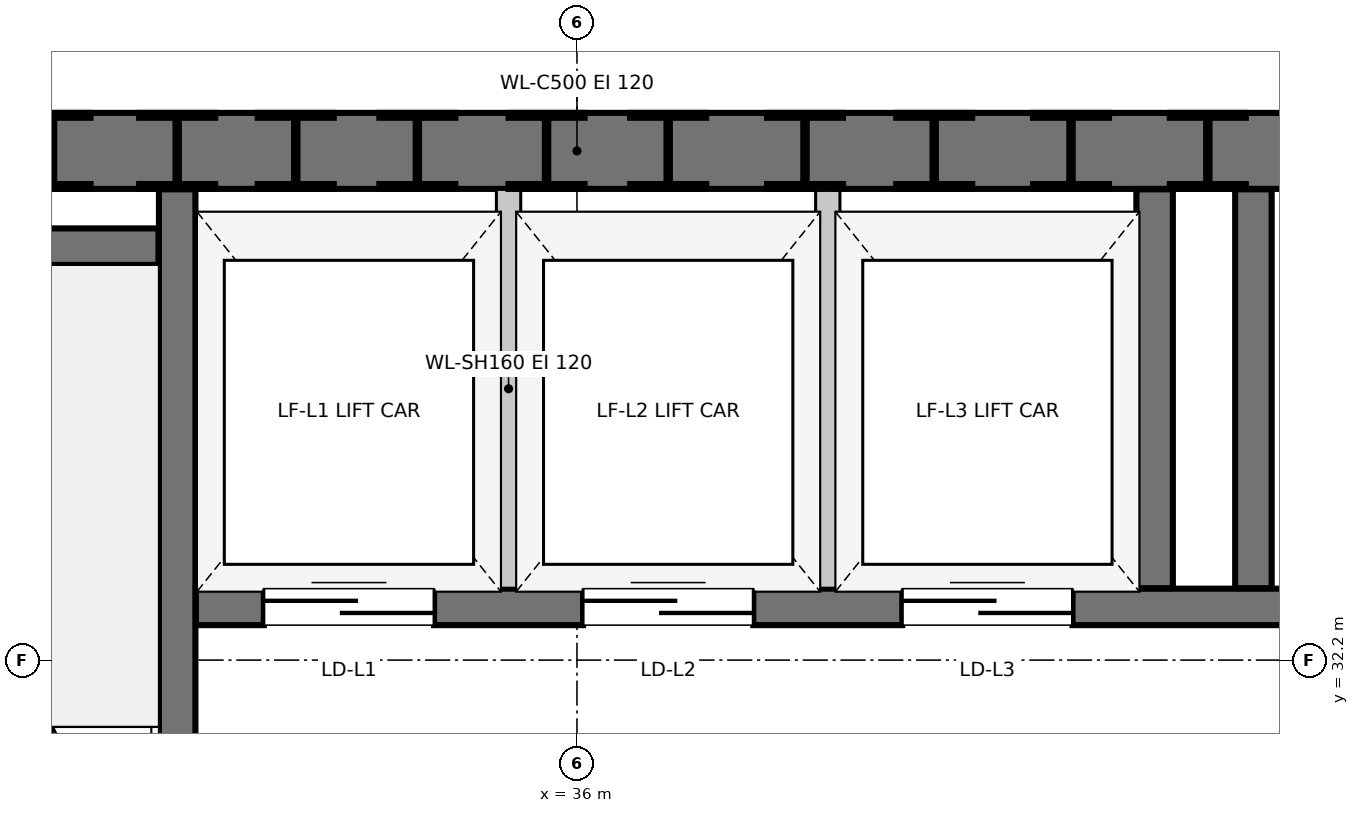
"""IFC4 building model, lengths in metres.
Left out: names, types, materials, properties, quantities, classifications, styles, units other than length and angle.
Written with IfcOpenShell. Run it as: python <this file> out.ifc"""

import sys

from ifc_helpers import new_model, si_unit, direction, frame, frame_2d, origin, origin_2d, place, context, subcontext, project, spatial, rectangle, i_section, extrude, element, fill, save


model = new_model("IFC4")
c1 = context("Model", 3, precision=1e-05, world=origin(), true_north=direction((0.0, 1.0)))
c2 = subcontext(c1, "Body", "Model", "MODEL_VIEW")
j1 = project(units=[si_unit("LENGTHUNIT", "METRE"), si_unit("PLANEANGLEUNIT", "RADIAN")], contexts=[c1])
p1 = place(None, origin())
s1 = spatial("IfcSite", under=j1, at=p1, CompositionType="ELEMENT")
p2 = place(p1, origin())
s2 = spatial("IfcBuilding", under=s1, at=p2, CompositionType="ELEMENT")
p3 = place(p2, frame((0.0, 0.0, 72.3)))
s3 = spatial("IfcBuildingStorey", under=s2, at=p3, CompositionType="ELEMENT", Elevation=72.3)
for number, where, z_axis, x_axis in (
    (1, (33.37, 35.55, 0.0), (0.0, 0.0, 1.0), (1.0, 0.0, 0.0)),
    (2, (34.95, 35.55, 0.0), (0.0, 0.0, 1.0), (1.0, 0.0, 0.0)),
    (3, (36.6, 35.55, 0.0), (0.0, 0.0, 1.0), (1.0, 0.0, 0.0)),
    (4, (38.35, 35.55, 0.0), (0.0, 0.0, 1.0), (1.0, 0.0, 0.0)),
    (5, (40.15, 35.55, 0.0), (0.0, 0.0, 1.0), (1.0, 0.0, 0.0)),
    (6, (32.55, 35.55, 0.0), (0.0, 0.0, 1.0), (1.0, 0.0, 0.0)),
    (7, (37.5, 35.55, 0.0), (0.0, 0.0, 1.0), (1.0, 0.0, 0.0)),
    (8, (34.15, 35.55, 0.0), (0.0, 0.0, 1.0), (1.0, 0.0, 0.0)),
    (9, (35.8, 35.55, 0.0), (0.0, 0.0, 1.0), (1.0, 0.0, 0.0)),
    (10, (39.25, 35.55, 0.0), (0.0, 0.0, 1.0), (1.0, 0.0, 0.0)),
):
    element("IfcColumn", number, at=place(p3, frame(where, z_axis=z_axis, x_axis=x_axis)), inside=s3, PredefinedType="COLUMN", context=c2, shape_type="SweptSolid", body=[
        extrude(i_section(OverallWidth=0.5, OverallDepth=0.5, WebThickness=0.022, FlangeThickness=0.032, at=origin_2d()), origin(), (0.0, 0.0, 1.0), 4.5),
    ])
p4 = place(p3, frame((50.35, 35.55, 0.0), z_axis=(0.0, 0.0, 1.0), x_axis=(-1.0, 0.0, 0.0)))
e11 = element("IfcWall", 11, at=p4, inside=s3, PredefinedType="SHEAR", context=c2, shape_type="SweptSolid", body=[
    extrude(rectangle(XDim=28.7, YDim=0.5, at=frame_2d((14.35, 0.0))), origin(), (0.0, 0.0, 1.0), 4.5),
])
p5 = place(p3, frame((33.37, 27.003, 0.0), z_axis=(0.0, 0.0, 1.0), x_axis=(0.0, 1.0, 0.0)))
e12 = element("IfcWall", 12, at=p5, inside=s3, PredefinedType="SHEAR", context=c2, shape_type="SweptSolid", body=[
    extrude(rectangle(XDim=8.294, YDim=0.24, at=frame_2d((4.147, 0.0))), origin(), (0.0, 0.0, 1.0), 4.5),
])
p6 = place(p3, frame((30.253, 34.92, 0.0), z_axis=(0.0, 0.0, 1.0), x_axis=(1.0, 0.0, 0.0)))
e13 = element("IfcWall", 13, at=p6, inside=s3, PredefinedType="SHEAR", context=c2, shape_type="SweptSolid", body=[
    extrude(rectangle(XDim=2.994, YDim=0.24, at=frame_2d((1.497, 0.0))), origin(), (0.0, 0.0, 1.0), 4.5),
])
p7 = place(p3, frame((33.493, 32.55, 0.0), z_axis=(0.0, 0.0, 1.0), x_axis=(1.0, 0.0, 0.0)))
e14 = element("IfcWall", 14, at=p7, inside=s3, PredefinedType="SHEAR", context=c2, shape_type="SweptSolid", body=[
    extrude(rectangle(XDim=13.214, YDim=0.24, at=frame_2d((6.607, 0.0))), origin(), (0.0, 0.0, 1.0), 4.5),
])
p8 = place(p7, frame((0.447, 0.0, 0.0)))
e15 = element("IfcOpeningElement", 15, at=p8, cuts=e14, PredefinedType="OPENING", context=c2, shape_type="SweptSolid", body=[
    extrude(rectangle(XDim=1.12, YDim=2.0, at=frame_2d((0.56, 1.0))), frame((0.0, 0.13, 0.0), z_axis=(0.0, -1.0, 0.0), x_axis=(1.0, 0.0, 0.0)), (0.0, 0.0, 1.0), 0.26),
])
p9 = place(p7, frame((2.547, 0.0, 0.0)))
e16 = element("IfcOpeningElement", 16, at=p9, cuts=e14, PredefinedType="OPENING", context=c2, shape_type="SweptSolid", body=[
    extrude(rectangle(XDim=1.12, YDim=2.0, at=frame_2d((0.56, 1.0))), frame((0.0, 0.13, 0.0), z_axis=(0.0, -1.0, 0.0), x_axis=(1.0, 0.0, 0.0)), (0.0, 0.0, 1.0), 0.26),
])
p10 = place(p7, frame((4.647, 0.0, 0.0)))
e17 = element("IfcOpeningElement", 17, at=p10, cuts=e14, PredefinedType="OPENING", context=c2, shape_type="SweptSolid", body=[
    extrude(rectangle(XDim=1.12, YDim=2.0, at=frame_2d((0.56, 1.0))), frame((0.0, 0.13, 0.0), z_axis=(0.0, -1.0, 0.0), x_axis=(1.0, 0.0, 0.0)), (0.0, 0.0, 1.0), 0.26),
])
for number, where, z_axis, x_axis in (
    (18, (39.8, 32.673, 0.0), (0.0, 0.0, 1.0), (0.0, 1.0, 0.0)),
    (19, (40.45, 32.673, 0.0), (0.0, 0.0, 1.0), (0.0, 1.0, 0.0)),
):
    element("IfcWall", number, at=place(p3, frame(where, z_axis=z_axis, x_axis=x_axis)), inside=s3, PredefinedType="SHEAR", context=c2, shape_type="SweptSolid", body=[
        extrude(rectangle(XDim=2.624, YDim=0.24, at=frame_2d((1.312, 0.0))), origin(), (0.0, 0.0, 1.0), 4.5),
    ])
for number, where, z_axis, x_axis in (
    (20, (35.55, 32.673, 0.0), (0.0, 0.0, 1.0), (0.0, 1.0, 0.0)),
    (21, (37.65, 32.673, 0.0), (0.0, 0.0, 1.0), (0.0, 1.0, 0.0)),
):
    element("IfcWall", number, at=place(p3, frame(where, z_axis=z_axis, x_axis=x_axis)), inside=s3, PredefinedType="MOVABLE", context=c2, shape_type="SweptSolid", body=[
        extrude(rectangle(XDim=2.624, YDim=0.16, at=frame_2d((1.312, 0.0))), origin(), (0.0, 0.0, 1.0), 4.185),
    ])
p11 = place(p8, origin())
e22 = element("IfcDoor", 22, at=p11, inside=s3, OperationType="DOUBLE_DOOR_SLIDING", PredefinedType="USERDEFINED", context=c2, shape_type="SweptSolid", body=[
    extrude(rectangle(XDim=1.12, YDim=2.0, at=frame_2d((0.56, 1.0))), frame((0.0, 0.025, 0.0), z_axis=(0.0, -1.0, 0.0), x_axis=(1.0, 0.0, 0.0)), (0.0, 0.0, 1.0), 0.05),
])
fill(e15, e22)
p12 = place(p9, origin())
e23 = element("IfcDoor", 23, at=p12, inside=s3, OperationType="DOUBLE_DOOR_SLIDING", PredefinedType="USERDEFINED", context=c2, shape_type="SweptSolid", body=[
    extrude(rectangle(XDim=1.12, YDim=2.0, at=frame_2d((0.56, 1.0))), frame((0.0, 0.025, 0.0), z_axis=(0.0, -1.0, 0.0), x_axis=(1.0, 0.0, 0.0)), (0.0, 0.0, 1.0), 0.05),
])
fill(e16, e23)
p13 = place(p10, origin())
e24 = element("IfcDoor", 24, at=p13, inside=s3, OperationType="DOUBLE_DOOR_SLIDING", PredefinedType="USERDEFINED", context=c2, shape_type="SweptSolid", body=[
    extrude(rectangle(XDim=1.12, YDim=2.0, at=frame_2d((0.56, 1.0))), frame((0.0, 0.025, 0.0), z_axis=(0.0, -1.0, 0.0), x_axis=(1.0, 0.0, 0.0)), (0.0, 0.0, 1.0), 0.05),
])
fill(e17, e24)
save(model, sys.argv[1])
